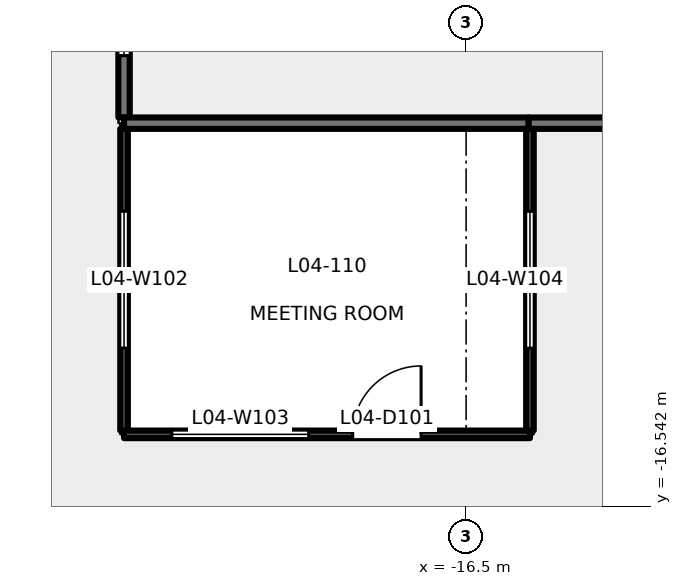
"""IFC4 building model, lengths in metres.
Left out: names, types, materials, properties, quantities, classifications, styles, units other than length and angle.
Written with IfcOpenShell. Run it as: python <this file> out.ifc"""

import sys

from ifc_helpers import new_model, si_unit, direction, frame, frame_2d, origin, place, context, subcontext, project, spatial, rectangle, extrude, element, fill, save


model = new_model("IFC4")
c1 = context("Model", 3, precision=1e-05, world=origin(), true_north=direction((0.0, 1.0)))
c2 = subcontext(c1, "Body", "Model", "MODEL_VIEW")
j1 = project(units=[si_unit("LENGTHUNIT", "METRE"), si_unit("PLANEANGLEUNIT", "RADIAN")], contexts=[c1])
p1 = place(None, origin())
s1 = spatial("IfcSite", under=j1, at=p1, CompositionType="ELEMENT")
p2 = place(p1, origin())
s2 = spatial("IfcBuilding", under=s1, at=p2, CompositionType="ELEMENT")
p3 = place(p2, frame((0.0, 0.0, 22.2)))
s3 = spatial("IfcBuildingStorey", under=s2, at=p3, CompositionType="ELEMENT", Elevation=22.2)
p4 = place(p3, frame((-21.0, -11.425, 0.0), z_axis=(0.0, 0.0, 1.0), x_axis=(0.0, 1.0, 0.0)))
e1 = element("IfcWall", 1, at=p4, inside=s3, PredefinedType="PARTITIONING", context=c2, shape_type="SweptSolid", body=[
    extrude(rectangle(XDim=4.025, YDim=0.15, at=frame_2d((2.013, 0.0))), origin(), (0.0, 0.0, 1.0), 4.0),
])
p5 = place(p4, frame((0.813, 0.0, 0.0)))
e2 = element("IfcOpeningElement", 2, at=p5, cuts=e1, PredefinedType="OPENING", context=c2, shape_type="SweptSolid", body=[
    extrude(rectangle(XDim=2.4, YDim=2.4, at=frame_2d((1.2, 1.2))), frame((0.0, 0.085, 0.0), z_axis=(0.0, -1.0, 0.0), x_axis=(1.0, 0.0, 0.0)), (0.0, 0.0, 1.0), 0.171),
])
p6 = place(p3, frame((-7.49, -11.5, 0.0), z_axis=(0.0, 0.0, 1.0), x_axis=(-1.0, 0.0, 0.0)))
e3 = element("IfcWall", 3, at=p6, inside=s3, PredefinedType="PARTITIONING", context=c2, shape_type="SweptSolid", body=[
    extrude(rectangle(XDim=8.19, YDim=0.15, at=frame_2d((4.095, 0.0))), origin(), (0.0, 0.0, 1.0), 3.6),
])
p7 = place(p6, frame((3.195, 0.0, 0.0)))
e4 = element("IfcOpeningElement", 4, at=p7, cuts=e3, PredefinedType="OPENING", context=c2, shape_type="SweptSolid", body=[
    extrude(rectangle(XDim=1.8, YDim=2.1, at=frame_2d((0.9, 1.05))), frame((0.0, 0.085, 0.0), z_axis=(0.0, -1.0, 0.0), x_axis=(1.0, 0.0, 0.0)), (0.0, 0.0, 1.0), 0.171),
])
p8 = place(p6, frame((0.698, 0.0, 0.0)))
e5 = element("IfcOpeningElement", 5, at=p8, cuts=e3, PredefinedType="OPENING", context=c2, shape_type="SweptSolid", body=[
    extrude(rectangle(XDim=1.8, YDim=2.4, at=frame_2d((0.9, 1.2))), frame((0.0, 0.085, 0.0), z_axis=(0.0, -1.0, 0.0), x_axis=(1.0, 0.0, 0.0)), (0.0, 0.0, 1.0), 0.171),
])
p9 = place(p3, frame((-15.68, -11.5, 0.0), z_axis=(0.0, 0.0, 1.0), x_axis=(-1.0, 0.0, 0.0)))
e6 = element("IfcWall", 6, at=p9, inside=s3, PredefinedType="PARTITIONING", context=c2, shape_type="SweptSolid", body=[
    extrude(rectangle(XDim=5.32, YDim=0.15, at=frame_2d((2.66, 0.0))), origin(), (0.0, 0.0, 1.0), 3.2),
])
p10 = place(p3, frame((-21.0, -11.575, 0.0), z_axis=(0.0, 0.0, 1.0), x_axis=(0.0, -1.0, 0.0)))
e7 = element("IfcWall", 7, at=p10, inside=s3, PredefinedType="PARTITIONING", context=c2, shape_type="SweptSolid", body=[
    extrude(rectangle(XDim=3.969, YDim=0.1, at=frame_2d((1.984, 0.0))), origin(), (0.0, 0.0, 1.0), 4.0),
])
p11 = place(p10, frame((1.084, 0.0, 0.9)))
e8 = element("IfcOpeningElement", 8, at=p11, cuts=e7, PredefinedType="OPENING", context=c2, shape_type="SweptSolid", body=[
    extrude(rectangle(XDim=1.8, YDim=1.2, at=frame_2d((0.9, 0.6))), frame((0.0, 0.061, 0.0), z_axis=(0.0, -1.0, 0.0), x_axis=(1.0, 0.0, 0.0)), (0.0, 0.0, 1.0), 0.121),
])
p12 = place(p3, frame((-21.0, -15.594, 0.0), z_axis=(0.0, 0.0, 1.0), x_axis=(1.0, 0.0, 0.0)))
e9 = element("IfcWall", 9, at=p12, inside=s3, PredefinedType="PARTITIONING", context=c2, shape_type="SweptSolid", body=[
    extrude(rectangle(XDim=5.34, YDim=0.1, at=frame_2d((2.67, 0.0))), origin(), (0.0, 0.0, 1.0), 3.2),
])
p13 = place(p12, frame((3.008, 0.0, 0.0)))
e10 = element("IfcOpeningElement", 10, at=p13, cuts=e9, PredefinedType="OPENING", context=c2, shape_type="SweptSolid", body=[
    extrude(rectangle(XDim=0.9, YDim=2.1, at=frame_2d((0.45, 1.05))), frame((0.0, 0.061, 0.0), z_axis=(0.0, -1.0, 0.0), x_axis=(1.0, 0.0, 0.0)), (0.0, 0.0, 1.0), 0.121),
])
p14 = place(p12, frame((0.629, 0.0, 0.9)))
e11 = element("IfcOpeningElement", 11, at=p14, cuts=e9, PredefinedType="OPENING", context=c2, shape_type="SweptSolid", body=[
    extrude(rectangle(XDim=1.8, YDim=1.2, at=frame_2d((0.9, 0.6))), frame((0.0, 0.061, 0.0), z_axis=(0.0, -1.0, 0.0), x_axis=(1.0, 0.0, 0.0)), (0.0, 0.0, 1.0), 0.121),
])
p15 = place(p3, frame((-15.66, -15.544, 0.0), z_axis=(0.0, 0.0, 1.0), x_axis=(0.0, 1.0, 0.0)))
e12 = element("IfcWall", 12, at=p15, inside=s3, PredefinedType="PARTITIONING", context=c2, shape_type="SweptSolid", body=[
    extrude(rectangle(XDim=3.969, YDim=0.1, at=frame_2d((1.984, 0.0))), origin(), (0.0, 0.0, 1.0), 4.6),
])
p16 = place(p15, frame((1.084, 0.0, 0.9)))
e13 = element("IfcOpeningElement", 13, at=p16, cuts=e12, PredefinedType="OPENING", context=c2, shape_type="SweptSolid", body=[
    extrude(rectangle(XDim=1.8, YDim=1.2, at=frame_2d((0.9, 0.6))), frame((0.0, 0.061, 0.0), z_axis=(0.0, -1.0, 0.0), x_axis=(1.0, 0.0, 0.0)), (0.0, 0.0, 1.0), 0.121),
])
p17 = place(p13, origin())
e14 = element("IfcDoor", 14, at=p17, inside=s3, OperationType="SINGLE_SWING_RIGHT", PredefinedType="DOOR", context=c2, shape_type="SweptSolid", body=[
    extrude(rectangle(XDim=0.9, YDim=2.1, at=frame_2d((0.45, 1.05))), frame((0.0, 0.025, 0.0), z_axis=(0.0, -1.0, 0.0), x_axis=(1.0, 0.0, 0.0)), (0.0, 0.0, 1.0), 0.05),
])
fill(e10, e14)
p18 = place(p5, origin())
e15 = element("IfcWindow", 15, at=p18, inside=s3, PartitioningType="SINGLE_PANEL", PredefinedType="WINDOW", context=c2, shape_type="SweptSolid", body=[
    extrude(rectangle(XDim=2.4, YDim=2.4, at=frame_2d((1.2, 1.2))), frame((0.0, 0.03, 0.0), z_axis=(0.0, -1.0, 0.0), x_axis=(1.0, 0.0, 0.0)), (0.0, 0.0, 1.0), 0.06),
])
fill(e2, e15)
p19 = place(p11, origin())
e16 = element("IfcWindow", 16, at=p19, inside=s3, PartitioningType="SINGLE_PANEL", PredefinedType="WINDOW", context=c2, shape_type="SweptSolid", body=[
    extrude(rectangle(XDim=1.8, YDim=1.2, at=frame_2d((0.9, 0.6))), frame((0.0, 0.03, 0.0), z_axis=(0.0, -1.0, 0.0), x_axis=(1.0, 0.0, 0.0)), (0.0, 0.0, 1.0), 0.06),
])
fill(e8, e16)
p20 = place(p14, origin())
e17 = element("IfcWindow", 17, at=p20, inside=s3, PartitioningType="SINGLE_PANEL", PredefinedType="WINDOW", context=c2, shape_type="SweptSolid", body=[
    extrude(rectangle(XDim=1.8, YDim=1.2, at=frame_2d((0.9, 0.6))), frame((0.0, 0.03, 0.0), z_axis=(0.0, -1.0, 0.0), x_axis=(1.0, 0.0, 0.0)), (0.0, 0.0, 1.0), 0.06),
])
fill(e11, e17)
p21 = place(p16, origin())
e18 = element("IfcWindow", 18, at=p21, inside=s3, PartitioningType="SINGLE_PANEL", PredefinedType="WINDOW", context=c2, shape_type="SweptSolid", body=[
    extrude(rectangle(XDim=1.8, YDim=1.2, at=frame_2d((0.9, 0.6))), frame((0.0, 0.03, 0.0), z_axis=(0.0, -1.0, 0.0), x_axis=(1.0, 0.0, 0.0)), (0.0, 0.0, 1.0), 0.06),
])
fill(e13, e18)
save(model, sys.argv[1])
